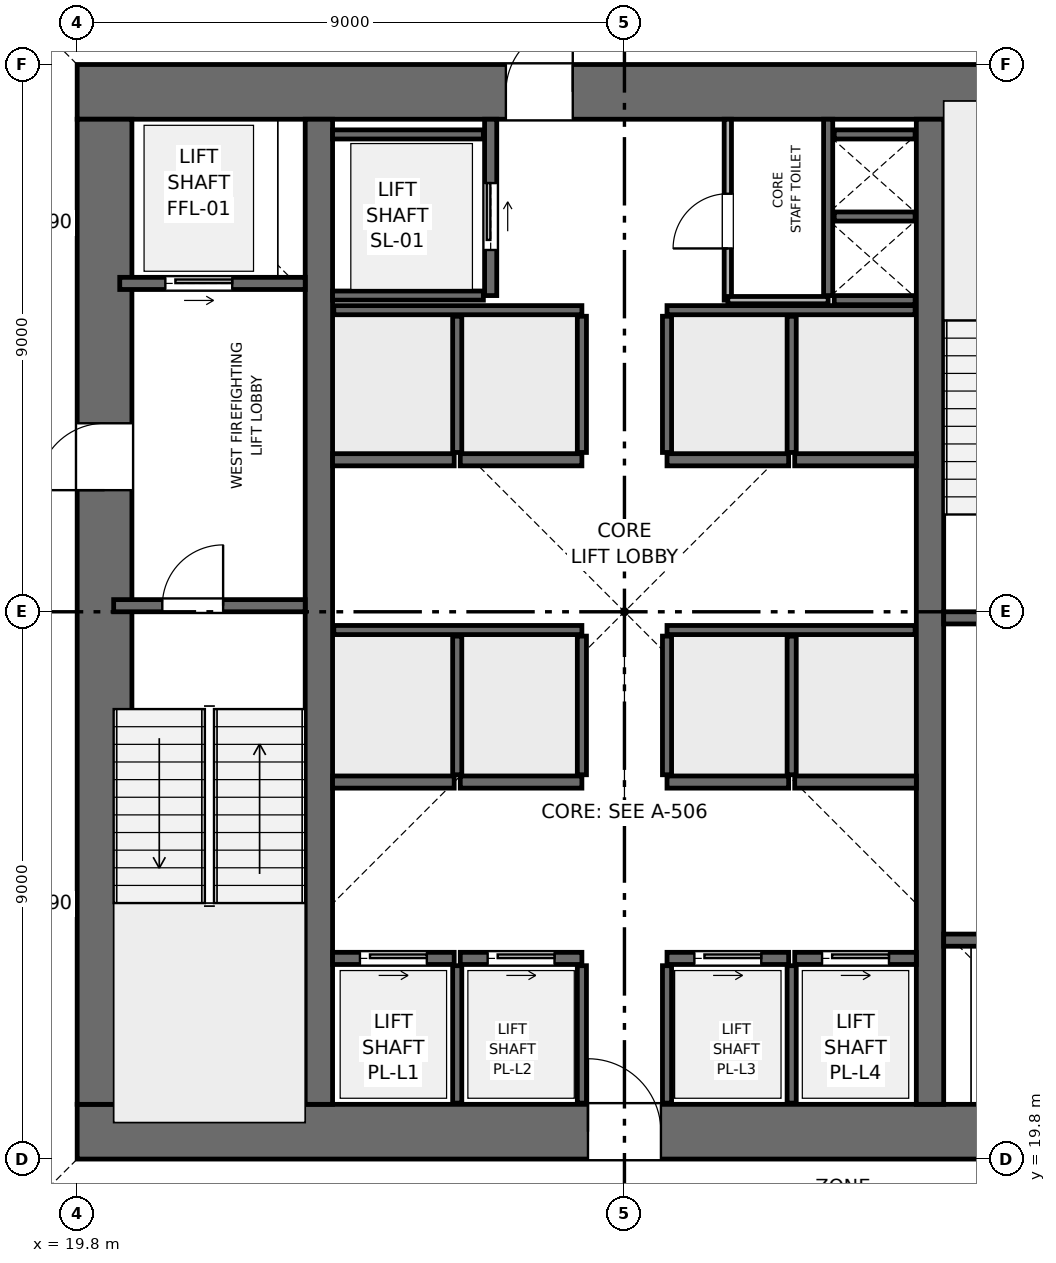
"""IFC4 building model, lengths in metres.
Left out: names, types, materials, properties, quantities, classifications, styles, units other than length and angle.
Written with IfcOpenShell. Run it as: python <this file> out.ifc"""

import sys

from ifc_helpers import new_model, si_unit, direction, frame, frame_2d, origin, place, context, subcontext, project, spatial, rectangle, extrude, element, fill, save


model = new_model("IFC4")
c1 = context("Model", 3, precision=1e-05, world=origin(), true_north=direction((0.0, 1.0)))
c2 = subcontext(c1, "Body", "Model", "MODEL_VIEW")
j1 = project(units=[si_unit("LENGTHUNIT", "METRE"), si_unit("PLANEANGLEUNIT", "RADIAN")], contexts=[c1])
p1 = place(None, origin())
s1 = spatial("IfcSite", under=j1, at=p1, CompositionType="ELEMENT")
p2 = place(p1, origin())
s2 = spatial("IfcBuilding", under=s1, at=p2, CompositionType="ELEMENT")
p3 = place(p2, frame((0.0, 0.0, 113.4)))
s3 = spatial("IfcBuildingStorey", under=s2, at=p3, CompositionType="ELEMENT", Elevation=113.4)
p4 = place(p3, frame((19.8, 20.25, 0.0), z_axis=(0.0, 0.0, 1.0), x_axis=(1.0, 0.0, 0.0)))
e1 = element("IfcWall", 1, at=p4, inside=s3, PredefinedType="SHEAR", context=c2, shape_type="SweptSolid", body=[
    extrude(rectangle(XDim=18.0, YDim=0.9, at=frame_2d((9.0, 0.0))), origin(), (0.0, 0.0, 1.0), 3.9),
])
p5 = place(p4, frame((8.4, 0.0, 0.0)))
e2 = element("IfcOpeningElement", 2, at=p5, cuts=e1, PredefinedType="OPENING", context=c2, shape_type="SweptSolid", body=[
    extrude(rectangle(XDim=1.2, YDim=2.2, at=frame_2d((0.6, 1.1))), frame((0.0, 0.46, 0.0), z_axis=(0.0, -1.0, 0.0), x_axis=(1.0, 0.0, 0.0)), (0.0, 0.0, 1.0), 0.92),
])
p6 = place(p3, frame((19.8, 37.35, 0.0), z_axis=(0.0, 0.0, 1.0), x_axis=(1.0, 0.0, 0.0)))
e3 = element("IfcWall", 3, at=p6, inside=s3, PredefinedType="SHEAR", context=c2, shape_type="SweptSolid", body=[
    extrude(rectangle(XDim=18.0, YDim=0.9, at=frame_2d((9.0, 0.0))), origin(), (0.0, 0.0, 1.0), 3.9),
])
p7 = place(p6, frame((7.05, 0.0, 0.0)))
e4 = element("IfcOpeningElement", 4, at=p7, cuts=e3, PredefinedType="OPENING", context=c2, shape_type="SweptSolid", body=[
    extrude(rectangle(XDim=1.1, YDim=2.15, at=frame_2d((0.55, 1.075))), frame((0.0, 0.46, 0.0), z_axis=(0.0, -1.0, 0.0), x_axis=(1.0, 0.0, 0.0)), (0.0, 0.0, 1.0), 0.92),
])
p8 = place(p3, frame((20.25, 20.7, 0.0), z_axis=(0.0, 0.0, 1.0), x_axis=(0.0, 1.0, 0.0)))
e5 = element("IfcWall", 5, at=p8, inside=s3, PredefinedType="SHEAR", context=c2, shape_type="SweptSolid", body=[
    extrude(rectangle(XDim=16.2, YDim=0.9, at=frame_2d((8.1, 0.0))), origin(), (0.0, 0.0, 1.0), 3.9),
])
p9 = place(p8, frame((10.1, 0.0, 0.0)))
e6 = element("IfcOpeningElement", 6, at=p9, cuts=e5, PredefinedType="OPENING", context=c2, shape_type="SweptSolid", body=[
    extrude(rectangle(XDim=1.1, YDim=2.15, at=frame_2d((0.55, 1.075))), frame((0.0, 0.46, 0.0), z_axis=(0.0, -1.0, 0.0), x_axis=(1.0, 0.0, 0.0)), (0.0, 0.0, 1.0), 0.92),
])
for number, where, z_axis, x_axis in (
    (7, (23.775, 20.7, 0.0), (0.0, 0.0, 1.0), (0.0, 1.0, 0.0)),
    (8, (33.825, 20.7, 0.0), (0.0, 0.0, 1.0), (0.0, 1.0, 0.0)),
):
    element("IfcWall", number, at=place(p3, frame(where, z_axis=z_axis, x_axis=x_axis)), inside=s3, PredefinedType="SHEAR", context=c2, shape_type="SweptSolid", body=[
        extrude(rectangle(XDim=16.2, YDim=0.45, at=frame_2d((8.1, 0.0))), origin(), (0.0, 0.0, 1.0), 3.9),
    ])
p10 = place(p3, frame((20.4, 28.9, 0.0), z_axis=(0.0, 0.0, 1.0), x_axis=(1.0, 0.0, 0.0)))
e9 = element("IfcWall", 9, at=p10, inside=s3, PredefinedType="SHEAR", context=c2, shape_type="SweptSolid", body=[
    extrude(rectangle(XDim=3.15, YDim=0.2, at=frame_2d((1.575, 0.0))), origin(), (0.0, 0.0, 1.0), 3.65),
])
p11 = place(p10, frame((0.8, 0.0, 0.0)))
e10 = element("IfcOpeningElement", 10, at=p11, cuts=e9, PredefinedType="OPENING", context=c2, shape_type="SweptSolid", body=[
    extrude(rectangle(XDim=1.0, YDim=2.1, at=frame_2d((0.5, 1.05))), frame((0.0, 0.11, 0.0), z_axis=(0.0, -1.0, 0.0), x_axis=(1.0, 0.0, 0.0)), (0.0, 0.0, 1.0), 0.22),
])
p12 = place(p3, frame((34.05, 28.7, 0.0), z_axis=(0.0, 0.0, 1.0), x_axis=(1.0, 0.0, 0.0)))
e11 = element("IfcWall", 11, at=p12, inside=s3, PredefinedType="SHEAR", context=c2, shape_type="SweptSolid", body=[
    extrude(rectangle(XDim=3.15, YDim=0.2, at=frame_2d((1.575, 0.0))), origin(), (0.0, 0.0, 1.0), 3.65),
])
p13 = place(p12, frame((0.8, 0.0, 0.0)))
e12 = element("IfcOpeningElement", 12, at=p13, cuts=e11, PredefinedType="OPENING", context=c2, shape_type="SweptSolid", body=[
    extrude(rectangle(XDim=1.0, YDim=2.1, at=frame_2d((0.5, 1.05))), frame((0.0, 0.11, 0.0), z_axis=(0.0, -1.0, 0.0), x_axis=(1.0, 0.0, 0.0)), (0.0, 0.0, 1.0), 0.22),
])
p14 = place(p3, frame((32.15, 34.0, 0.0), z_axis=(0.0, 0.0, 1.0), x_axis=(0.0, 1.0, 0.0)))
e13 = element("IfcWall", 13, at=p14, inside=s3, PredefinedType="SHEAR", context=c2, shape_type="SweptSolid", body=[
    extrude(rectangle(XDim=2.9, YDim=0.15, at=frame_2d((1.45, 0.0))), origin(), (0.0, 0.0, 1.0), 3.65),
])
for number, where, z_axis, x_axis in (
    (14, (32.25, 33.925, 0.0), (0.0, 0.0, 1.0), (1.0, 0.0, 0.0)),
    (15, (32.25, 35.3, 0.0), (0.0, 0.0, 1.0), (1.0, 0.0, 0.0)),
):
    element("IfcWall", number, at=place(p3, frame(where, z_axis=z_axis, x_axis=x_axis)), inside=s3, PredefinedType="SHEAR", context=c2, shape_type="SweptSolid", body=[
        extrude(rectangle(XDim=1.33, YDim=0.15, at=frame_2d((0.665, 0.0))), origin(), (0.0, 0.0, 1.0), 3.65),
    ])
p15 = place(p3, frame((20.5, 34.2, 0.0), z_axis=(0.0, 0.0, 1.0), x_axis=(1.0, 0.0, 0.0)))
e16 = element("IfcWall", 16, at=p15, inside=s3, PredefinedType="SHEAR", context=c2, shape_type="SweptSolid", body=[
    extrude(rectangle(XDim=3.05, YDim=0.2, at=frame_2d((1.525, 0.0))), origin(), (0.0, 0.0, 1.0), 3.65),
])
p16 = place(p15, frame((0.75, 0.0, 0.0)))
e17 = element("IfcOpeningElement", 17, at=p16, cuts=e16, PredefinedType="OPENING", context=c2, shape_type="SweptSolid", body=[
    extrude(rectangle(XDim=1.1, YDim=2.15, at=frame_2d((0.55, 1.075))), frame((0.0, 0.11, 0.0), z_axis=(0.0, -1.0, 0.0), x_axis=(1.0, 0.0, 0.0)), (0.0, 0.0, 1.0), 0.22),
])
p17 = place(p3, frame((34.05, 23.4, 0.0), z_axis=(0.0, 0.0, 1.0), x_axis=(1.0, 0.0, 0.0)))
e18 = element("IfcWall", 18, at=p17, inside=s3, PredefinedType="SHEAR", context=c2, shape_type="SweptSolid", body=[
    extrude(rectangle(XDim=3.05, YDim=0.2, at=frame_2d((1.525, 0.0))), origin(), (0.0, 0.0, 1.0), 3.65),
])
p18 = place(p17, frame((1.2, 0.0, 0.0)))
e19 = element("IfcOpeningElement", 19, at=p18, cuts=e18, PredefinedType="OPENING", context=c2, shape_type="SweptSolid", body=[
    extrude(rectangle(XDim=1.1, YDim=2.15, at=frame_2d((0.55, 1.075))), frame((0.0, 0.11, 0.0), z_axis=(0.0, -1.0, 0.0), x_axis=(1.0, 0.0, 0.0)), (0.0, 0.0, 1.0), 0.22),
])
p19 = place(p3, frame((26.6, 34.0, 0.0), z_axis=(0.0, 0.0, 1.0), x_axis=(0.0, 1.0, 0.0)))
e20 = element("IfcWall", 20, at=p19, inside=s3, PredefinedType="SHEAR", context=c2, shape_type="SweptSolid", body=[
    extrude(rectangle(XDim=2.9, YDim=0.2, at=frame_2d((1.45, 0.0))), origin(), (0.0, 0.0, 1.0), 3.65),
])
p20 = place(p19, frame((0.75, 0.0, 0.0)))
e21 = element("IfcOpeningElement", 21, at=p20, cuts=e20, PredefinedType="OPENING", context=c2, shape_type="SweptSolid", body=[
    extrude(rectangle(XDim=1.1, YDim=2.15, at=frame_2d((0.55, 1.075))), frame((0.0, 0.11, 0.0), z_axis=(0.0, -1.0, 0.0), x_axis=(1.0, 0.0, 0.0)), (0.0, 0.0, 1.0), 0.22),
])
for number, where, z_axis, x_axis in (
    (22, (24.0, 34.0, 0.0), (0.0, 0.0, 1.0), (1.0, 0.0, 0.0)),
    (23, (24.0, 36.65, 0.0), (0.0, 0.0, 1.0), (1.0, 0.0, 0.0)),
):
    element("IfcWall", number, at=place(p3, frame(where, z_axis=z_axis, x_axis=x_axis)), inside=s3, PredefinedType="SHEAR", context=c2, shape_type="SweptSolid", body=[
        extrude(rectangle(XDim=2.48, YDim=0.15, at=frame_2d((1.24, 0.0))), origin(), (0.0, 0.0, 1.0), 3.65),
    ])
p21 = place(p3, frame((24.0, 23.1, 0.0), z_axis=(0.0, 0.0, 1.0), x_axis=(1.0, 0.0, 0.0)))
e24 = element("IfcWall", 24, at=p21, inside=s3, PredefinedType="SHEAR", context=c2, shape_type="SweptSolid", body=[
    extrude(rectangle(XDim=2.0, YDim=0.2, at=frame_2d((1.0, 0.0))), origin(), (0.0, 0.0, 1.0), 3.65),
])
p22 = place(p21, frame((0.45, 0.0, 0.0)))
e25 = element("IfcOpeningElement", 25, at=p22, cuts=e24, PredefinedType="OPENING", context=c2, shape_type="SweptSolid", body=[
    extrude(rectangle(XDim=1.1, YDim=2.15, at=frame_2d((0.55, 1.075))), frame((0.0, 0.11, 0.0), z_axis=(0.0, -1.0, 0.0), x_axis=(1.0, 0.0, 0.0)), (0.0, 0.0, 1.0), 0.22),
])
p23 = place(p3, frame((26.1, 23.1, 0.0), z_axis=(0.0, 0.0, 1.0), x_axis=(1.0, 0.0, 0.0)))
e26 = element("IfcWall", 26, at=p23, inside=s3, PredefinedType="SHEAR", context=c2, shape_type="SweptSolid", body=[
    extrude(rectangle(XDim=2.0, YDim=0.2, at=frame_2d((1.0, 0.0))), origin(), (0.0, 0.0, 1.0), 3.65),
])
p24 = place(p23, frame((0.45, 0.0, 0.0)))
e27 = element("IfcOpeningElement", 27, at=p24, cuts=e26, PredefinedType="OPENING", context=c2, shape_type="SweptSolid", body=[
    extrude(rectangle(XDim=1.1, YDim=2.15, at=frame_2d((0.55, 1.075))), frame((0.0, 0.11, 0.0), z_axis=(0.0, -1.0, 0.0), x_axis=(1.0, 0.0, 0.0)), (0.0, 0.0, 1.0), 0.22),
])
p25 = place(p3, frame((29.5, 23.1, 0.0), z_axis=(0.0, 0.0, 1.0), x_axis=(1.0, 0.0, 0.0)))
e28 = element("IfcWall", 28, at=p25, inside=s3, PredefinedType="SHEAR", context=c2, shape_type="SweptSolid", body=[
    extrude(rectangle(XDim=2.0, YDim=0.2, at=frame_2d((1.0, 0.0))), origin(), (0.0, 0.0, 1.0), 3.65),
])
p26 = place(p25, frame((0.45, 0.0, 0.0)))
e29 = element("IfcOpeningElement", 29, at=p26, cuts=e28, PredefinedType="OPENING", context=c2, shape_type="SweptSolid", body=[
    extrude(rectangle(XDim=1.1, YDim=2.15, at=frame_2d((0.55, 1.075))), frame((0.0, 0.11, 0.0), z_axis=(0.0, -1.0, 0.0), x_axis=(1.0, 0.0, 0.0)), (0.0, 0.0, 1.0), 0.22),
])
p27 = place(p3, frame((31.6, 23.1, 0.0), z_axis=(0.0, 0.0, 1.0), x_axis=(1.0, 0.0, 0.0)))
e30 = element("IfcWall", 30, at=p27, inside=s3, PredefinedType="SHEAR", context=c2, shape_type="SweptSolid", body=[
    extrude(rectangle(XDim=2.0, YDim=0.2, at=frame_2d((1.0, 0.0))), origin(), (0.0, 0.0, 1.0), 3.65),
])
p28 = place(p27, frame((0.45, 0.0, 0.0)))
e31 = element("IfcOpeningElement", 31, at=p28, cuts=e30, PredefinedType="OPENING", context=c2, shape_type="SweptSolid", body=[
    extrude(rectangle(XDim=1.1, YDim=2.15, at=frame_2d((0.55, 1.075))), frame((0.0, 0.11, 0.0), z_axis=(0.0, -1.0, 0.0), x_axis=(1.0, 0.0, 0.0)), (0.0, 0.0, 1.0), 0.22),
])
for number, where, z_axis, x_axis in (
    (32, (24.0, 26.0, 0.0), (0.0, 0.0, 1.0), (1.0, 0.0, 0.0)),
    (33, (26.1, 26.0, 0.0), (0.0, 0.0, 1.0), (1.0, 0.0, 0.0)),
    (34, (29.5, 26.0, 0.0), (0.0, 0.0, 1.0), (1.0, 0.0, 0.0)),
    (35, (31.6, 26.0, 0.0), (0.0, 0.0, 1.0), (1.0, 0.0, 0.0)),
    (36, (24.0, 31.3, 0.0), (0.0, 0.0, 1.0), (1.0, 0.0, 0.0)),
    (37, (26.1, 31.3, 0.0), (0.0, 0.0, 1.0), (1.0, 0.0, 0.0)),
    (38, (29.5, 31.3, 0.0), (0.0, 0.0, 1.0), (1.0, 0.0, 0.0)),
    (39, (31.6, 31.3, 0.0), (0.0, 0.0, 1.0), (1.0, 0.0, 0.0)),
):
    element("IfcWall", number, at=place(p3, frame(where, z_axis=z_axis, x_axis=x_axis)), inside=s3, PredefinedType="SHEAR", context=c2, shape_type="SweptSolid", body=[
        extrude(rectangle(XDim=2.0, YDim=0.2, at=frame_2d((1.0, 0.0))), origin(), (0.0, 0.0, 1.0), 3.65),
    ])
p29 = place(p3, frame((32.25, 36.65, 0.0), z_axis=(0.0, 0.0, 1.0), x_axis=(1.0, 0.0, 0.0)))
e40 = element("IfcWall", 40, at=p29, inside=s3, PredefinedType="SHEAR", context=c2, shape_type="SweptSolid", body=[
    extrude(rectangle(XDim=1.33, YDim=0.15, at=frame_2d((0.665, 0.0))), origin(), (0.0, 0.0, 1.0), 3.65),
])
for number, where, z_axis, x_axis in (
    (41, (26.05, 20.72, 0.0), (0.0, 0.0, 1.0), (0.0, 1.0, 0.0)),
    (42, (28.1, 20.72, 0.0), (0.0, 0.0, 1.0), (0.0, 1.0, 0.0)),
    (43, (29.5, 20.72, 0.0), (0.0, 0.0, 1.0), (0.0, 1.0, 0.0)),
    (44, (31.55, 20.72, 0.0), (0.0, 0.0, 1.0), (0.0, 1.0, 0.0)),
):
    element("IfcWall", number, at=place(p3, frame(where, z_axis=z_axis, x_axis=x_axis)), inside=s3, PredefinedType="SHEAR", context=c2, shape_type="SweptSolid", body=[
        extrude(rectangle(XDim=2.26, YDim=0.15, at=frame_2d((1.13, 0.0))), origin(), (0.0, 0.0, 1.0), 3.65),
    ])
for number, where, z_axis, x_axis in (
    (45, (24.02, 28.5, 0.0), (0.0, 0.0, 1.0), (1.0, 0.0, 0.0)),
    (46, (29.5, 28.5, 0.0), (0.0, 0.0, 1.0), (1.0, 0.0, 0.0)),
):
    element("IfcWall", number, at=place(p3, frame(where, z_axis=z_axis, x_axis=x_axis)), inside=s3, PredefinedType="SHEAR", context=c2, shape_type="SweptSolid", body=[
        extrude(rectangle(XDim=4.08, YDim=0.15, at=frame_2d((2.04, 0.0))), origin(), (0.0, 0.0, 1.0), 3.65),
    ])
for number, where, z_axis, x_axis in (
    (47, (26.05, 26.12, 0.0), (0.0, 0.0, 1.0), (0.0, 1.0, 0.0)),
    (48, (28.1, 26.12, 0.0), (0.0, 0.0, 1.0), (0.0, 1.0, 0.0)),
    (49, (29.5, 26.12, 0.0), (0.0, 0.0, 1.0), (0.0, 1.0, 0.0)),
    (50, (31.55, 26.12, 0.0), (0.0, 0.0, 1.0), (0.0, 1.0, 0.0)),
):
    element("IfcWall", number, at=place(p3, frame(where, z_axis=z_axis, x_axis=x_axis)), inside=s3, PredefinedType="SHEAR", context=c2, shape_type="SweptSolid", body=[
        extrude(rectangle(XDim=2.28, YDim=0.15, at=frame_2d((1.14, 0.0))), origin(), (0.0, 0.0, 1.0), 3.65),
    ])
for number, where, z_axis, x_axis in (
    (51, (24.02, 33.76, 0.0), (0.0, 0.0, 1.0), (1.0, 0.0, 0.0)),
    (52, (29.5, 33.76, 0.0), (0.0, 0.0, 1.0), (1.0, 0.0, 0.0)),
):
    element("IfcWall", number, at=place(p3, frame(where, z_axis=z_axis, x_axis=x_axis)), inside=s3, PredefinedType="SHEAR", context=c2, shape_type="SweptSolid", body=[
        extrude(rectangle(XDim=4.08, YDim=0.15, at=frame_2d((2.04, 0.0))), origin(), (0.0, 0.0, 1.0), 3.65),
    ])
for number, where, z_axis, x_axis in (
    (53, (26.05, 31.42, 0.0), (0.0, 0.0, 1.0), (0.0, 1.0, 0.0)),
    (54, (28.1, 31.42, 0.0), (0.0, 0.0, 1.0), (0.0, 1.0, 0.0)),
    (55, (29.5, 31.42, 0.0), (0.0, 0.0, 1.0), (0.0, 1.0, 0.0)),
    (56, (31.55, 31.42, 0.0), (0.0, 0.0, 1.0), (0.0, 1.0, 0.0)),
):
    element("IfcWall", number, at=place(p3, frame(where, z_axis=z_axis, x_axis=x_axis)), inside=s3, PredefinedType="SHEAR", context=c2, shape_type="SweptSolid", body=[
        extrude(rectangle(XDim=2.24, YDim=0.15, at=frame_2d((1.12, 0.0))), origin(), (0.0, 0.0, 1.0), 3.65),
    ])
p30 = place(p3, frame((30.5, 33.925, 0.0), z_axis=(0.0, 0.0, 1.0), x_axis=(0.0, 1.0, 0.0)))
e57 = element("IfcWall", 57, at=p30, inside=s3, PredefinedType="PARTITIONING", context=c2, shape_type="SweptSolid", body=[
    extrude(rectangle(XDim=2.975, YDim=0.12, at=frame_2d((1.487, 0.0))), origin(), (0.0, 0.0, 1.0), 3.65),
])
p31 = place(p30, frame((0.85, 0.0, 0.0)))
e58 = element("IfcOpeningElement", 58, at=p31, cuts=e57, PredefinedType="OPENING", context=c2, shape_type="SweptSolid", body=[
    extrude(rectangle(XDim=0.9, YDim=2.1, at=frame_2d((0.45, 1.05))), frame((0.0, 0.07, 0.0), z_axis=(0.0, -1.0, 0.0), x_axis=(1.0, 0.0, 0.0)), (0.0, 0.0, 1.0), 0.14),
])
p32 = place(p3, frame((30.5, 33.925, 0.0), z_axis=(0.0, 0.0, 1.0), x_axis=(1.0, 0.0, 0.0)))
e59 = element("IfcWall", 59, at=p32, inside=s3, PredefinedType="PARTITIONING", context=c2, shape_type="SweptSolid", body=[
    extrude(rectangle(XDim=1.65, YDim=0.12, at=frame_2d((0.825, 0.0))), origin(), (0.0, 0.0, 1.0), 3.65),
])
p33 = place(p11, origin())
e60 = element("IfcDoor", 60, at=p33, inside=s3, OperationType="SINGLE_SWING_RIGHT", PredefinedType="DOOR", context=c2, shape_type="SweptSolid", body=[
    extrude(rectangle(XDim=1.0, YDim=2.1, at=frame_2d((0.5, 1.05))), frame((0.0, 0.025, 0.0), z_axis=(0.0, -1.0, 0.0), x_axis=(1.0, 0.0, 0.0)), (0.0, 0.0, 1.0), 0.05),
])
fill(e10, e60)
p34 = place(p16, origin())
e61 = element("IfcDoor", 61, at=p34, inside=s3, OperationType="SLIDING_TO_RIGHT", PredefinedType="DOOR", context=c2, shape_type="SweptSolid", body=[
    extrude(rectangle(XDim=1.1, YDim=2.15, at=frame_2d((0.55, 1.075))), frame((0.0, 0.025, 0.0), z_axis=(0.0, -1.0, 0.0), x_axis=(1.0, 0.0, 0.0)), (0.0, 0.0, 1.0), 0.05),
])
fill(e17, e61)
p35 = place(p20, origin())
e62 = element("IfcDoor", 62, at=p35, inside=s3, OperationType="SLIDING_TO_RIGHT", PredefinedType="DOOR", context=c2, shape_type="SweptSolid", body=[
    extrude(rectangle(XDim=1.1, YDim=2.15, at=frame_2d((0.55, 1.075))), frame((0.0, 0.025, 0.0), z_axis=(0.0, -1.0, 0.0), x_axis=(1.0, 0.0, 0.0)), (0.0, 0.0, 1.0), 0.05),
])
fill(e21, e62)
p36 = place(p22, origin())
e63 = element("IfcDoor", 63, at=p36, inside=s3, OperationType="SLIDING_TO_RIGHT", PredefinedType="DOOR", context=c2, shape_type="SweptSolid", body=[
    extrude(rectangle(XDim=1.1, YDim=2.15, at=frame_2d((0.55, 1.075))), frame((0.0, 0.025, 0.0), z_axis=(0.0, -1.0, 0.0), x_axis=(1.0, 0.0, 0.0)), (0.0, 0.0, 1.0), 0.05),
])
fill(e25, e63)
p37 = place(p24, origin())
e64 = element("IfcDoor", 64, at=p37, inside=s3, OperationType="SLIDING_TO_RIGHT", PredefinedType="DOOR", context=c2, shape_type="SweptSolid", body=[
    extrude(rectangle(XDim=1.1, YDim=2.15, at=frame_2d((0.55, 1.075))), frame((0.0, 0.025, 0.0), z_axis=(0.0, -1.0, 0.0), x_axis=(1.0, 0.0, 0.0)), (0.0, 0.0, 1.0), 0.05),
])
fill(e27, e64)
p38 = place(p26, origin())
e65 = element("IfcDoor", 65, at=p38, inside=s3, OperationType="SLIDING_TO_RIGHT", PredefinedType="DOOR", context=c2, shape_type="SweptSolid", body=[
    extrude(rectangle(XDim=1.1, YDim=2.15, at=frame_2d((0.55, 1.075))), frame((0.0, 0.025, 0.0), z_axis=(0.0, -1.0, 0.0), x_axis=(1.0, 0.0, 0.0)), (0.0, 0.0, 1.0), 0.05),
])
fill(e29, e65)
p39 = place(p28, origin())
e66 = element("IfcDoor", 66, at=p39, inside=s3, OperationType="SLIDING_TO_RIGHT", PredefinedType="DOOR", context=c2, shape_type="SweptSolid", body=[
    extrude(rectangle(XDim=1.1, YDim=2.15, at=frame_2d((0.55, 1.075))), frame((0.0, 0.025, 0.0), z_axis=(0.0, -1.0, 0.0), x_axis=(1.0, 0.0, 0.0)), (0.0, 0.0, 1.0), 0.05),
])
fill(e31, e66)
p40 = place(p31, origin())
e67 = element("IfcDoor", 67, at=p40, inside=s3, OperationType="SINGLE_SWING_LEFT", PredefinedType="DOOR", context=c2, shape_type="SweptSolid", body=[
    extrude(rectangle(XDim=0.9, YDim=2.1, at=frame_2d((0.45, 1.05))), frame((0.0, 0.025, 0.0), z_axis=(0.0, -1.0, 0.0), x_axis=(1.0, 0.0, 0.0)), (0.0, 0.0, 1.0), 0.05),
])
fill(e58, e67)
p41 = place(p9, origin())
e68 = element("IfcDoor", 68, at=p41, inside=s3, OperationType="SINGLE_SWING_LEFT", PredefinedType="DOOR", context=c2, shape_type="SweptSolid", body=[
    extrude(rectangle(XDim=1.1, YDim=2.15, at=frame_2d((0.55, 1.075))), frame((0.0, 0.025, 0.0), z_axis=(0.0, -1.0, 0.0), x_axis=(1.0, 0.0, 0.0)), (0.0, 0.0, 1.0), 0.05),
])
fill(e6, e68)
p42 = place(p5, origin())
e69 = element("IfcDoor", 69, at=p42, inside=s3, OperationType="SINGLE_SWING_LEFT", PredefinedType="DOOR", context=c2, shape_type="SweptSolid", body=[
    extrude(rectangle(XDim=1.2, YDim=2.2, at=frame_2d((0.6, 1.1))), frame((0.0, 0.025, 0.0), z_axis=(0.0, -1.0, 0.0), x_axis=(1.0, 0.0, 0.0)), (0.0, 0.0, 1.0), 0.05),
])
fill(e2, e69)
p43 = place(p7, origin())
e70 = element("IfcDoor", 70, at=p43, inside=s3, OperationType="SINGLE_SWING_RIGHT", PredefinedType="DOOR", context=c2, shape_type="SweptSolid", body=[
    extrude(rectangle(XDim=1.1, YDim=2.15, at=frame_2d((0.55, 1.075))), frame((0.0, 0.025, 0.0), z_axis=(0.0, -1.0, 0.0), x_axis=(1.0, 0.0, 0.0)), (0.0, 0.0, 1.0), 0.05),
])
fill(e4, e70)
save(model, sys.argv[1])
